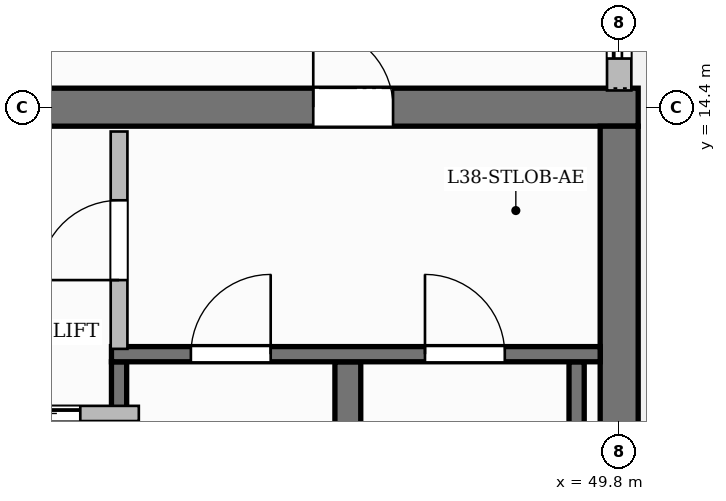
"""IFC4 building model, lengths in metres.
Left out: names, types, materials, properties, quantities, classifications, styles, units other than length and angle.
Written with IfcOpenShell. Run it as: python <this file> out.ifc"""

import sys

from ifc_helpers import new_model, si_unit, direction, frame, frame_2d, origin, place, context, subcontext, project, spatial, rectangle, extrude, source, transform, mapped, element, fill, save


model = new_model("IFC4")
c1 = context("Model", 3, precision=1e-05, world=origin(), true_north=direction((0.0, 1.0)))
c2 = subcontext(c1, "Body", "Model", "MODEL_VIEW")
j1 = project(units=[si_unit("LENGTHUNIT", "METRE"), si_unit("PLANEANGLEUNIT", "RADIAN")], contexts=[c1])
p1 = place(None, origin())
s1 = spatial("IfcSite", under=j1, at=p1, CompositionType="ELEMENT")
p2 = place(p1, origin())
s2 = spatial("IfcBuilding", under=s1, at=p2, CompositionType="ELEMENT")
p3 = place(p2, frame((0.0, 0.0, 154.15)))
s3 = spatial("IfcBuildingStorey", under=s2, at=p3, CompositionType="ELEMENT", Elevation=154.15)
p4 = place(p3, frame((34.55, 14.4, 0.0), z_axis=(0.0, 0.0, 1.0), x_axis=(1.0, 0.0, 0.0)))
e1 = element("IfcWall", 1, at=p4, inside=s3, PredefinedType="SHEAR", context=c2, shape_type="SweptSolid", body=[
    extrude(rectangle(XDim=15.5, YDim=0.5, at=frame_2d((7.75, 0.0))), origin(), (0.0, 0.0, 1.0), 3.85),
])
p5 = place(p4, frame((5.38, 0.0, 0.0)))
e2 = element("IfcOpeningElement", 2, at=p5, cuts=e1, PredefinedType="OPENING", context=c2, shape_type="SweptSolid", body=[
    extrude(rectangle(XDim=1.5, YDim=2.2, at=frame_2d((0.75, 1.1))), frame((0.0, 0.26, 0.0), z_axis=(0.0, -1.0, 0.0), x_axis=(1.0, 0.0, 0.0)), (0.0, 0.0, 1.0), 0.52),
])
p6 = place(p4, frame((1.595, 0.0, 0.0)))
e3 = element("IfcOpeningElement", 3, at=p6, cuts=e1, PredefinedType="OPENING", context=c2, shape_type="SweptSolid", body=[
    extrude(rectangle(XDim=1.05, YDim=2.15, at=frame_2d((0.525, 1.075))), frame((0.0, 0.26, 0.0), z_axis=(0.0, -1.0, 0.0), x_axis=(1.0, 0.0, 0.0)), (0.0, 0.0, 1.0), 0.52),
])
p7 = place(p4, frame((11.225, 0.0, 0.0)))
e4 = element("IfcOpeningElement", 4, at=p7, cuts=e1, PredefinedType="OPENING", context=c2, shape_type="SweptSolid", body=[
    extrude(rectangle(XDim=1.05, YDim=2.15, at=frame_2d((0.525, 1.075))), frame((0.0, 0.26, 0.0), z_axis=(0.0, -1.0, 0.0), x_axis=(1.0, 0.0, 0.0)), (0.0, 0.0, 1.0), 0.52),
])
p8 = place(p3, frame((49.8, 3.85, 0.0), z_axis=(0.0, 0.0, 1.0), x_axis=(0.0, 1.0, 0.0)))
e5 = element("IfcWall", 5, at=p8, inside=s3, PredefinedType="SHEAR", context=c2, shape_type="SweptSolid", body=[
    extrude(rectangle(XDim=10.3, YDim=0.5, at=frame_2d((5.15, 0.0))), origin(), (0.0, 0.0, 1.0), 3.85),
])
p9 = place(p3, frame((43.22, 4.1, 0.0), z_axis=(0.0, 0.0, 1.0), x_axis=(0.0, 1.0, 0.0)))
e6 = element("IfcWall", 6, at=p9, inside=s3, PredefinedType="SHEAR", context=c2, shape_type="SweptSolid", body=[
    extrude(rectangle(XDim=6.95, YDim=0.2, at=frame_2d((3.475, 0.0))), origin(), (0.0, 0.0, 1.0), 3.85),
])
p10 = place(p3, frame((46.23, 4.1, 0.0), z_axis=(0.0, 0.0, 1.0), x_axis=(0.0, 1.0, 0.0)))
e7 = element("IfcWall", 7, at=p10, inside=s3, PredefinedType="SHEAR", context=c2, shape_type="SweptSolid", body=[
    extrude(rectangle(XDim=6.95, YDim=0.34, at=frame_2d((3.475, 0.0))), origin(), (0.0, 0.0, 1.0), 3.85),
])
p11 = place(p3, frame((49.24, 4.1, 0.0), z_axis=(0.0, 0.0, 1.0), x_axis=(0.0, 1.0, 0.0)))
e8 = element("IfcWall", 8, at=p11, inside=s3, PredefinedType="SHEAR", context=c2, shape_type="SweptSolid", body=[
    extrude(rectangle(XDim=6.95, YDim=0.2, at=frame_2d((3.475, 0.0))), origin(), (0.0, 0.0, 1.0), 3.85),
])
p12 = place(p3, frame((43.12, 11.15, 0.0), z_axis=(0.0, 0.0, 1.0), x_axis=(1.0, 0.0, 0.0)))
e9 = element("IfcWall", 9, at=p12, inside=s3, PredefinedType="SHEAR", context=c2, shape_type="SweptSolid", body=[
    extrude(rectangle(XDim=6.43, YDim=0.2, at=frame_2d((3.215, 0.0))), origin(), (0.0, 0.0, 1.0), 3.85),
])
p13 = place(p12, frame((1.045, 0.0, 0.0)))
e10 = element("IfcOpeningElement", 10, at=p13, cuts=e9, PredefinedType="OPENING", context=c2, shape_type="SweptSolid", body=[
    extrude(rectangle(XDim=1.05, YDim=2.2, at=frame_2d((0.525, 1.1))), frame((0.0, 0.11, 0.0), z_axis=(0.0, -1.0, 0.0), x_axis=(1.0, 0.0, 0.0)), (0.0, 0.0, 1.0), 0.22),
])
p14 = place(p12, frame((4.125, 0.0, 0.0)))
e11 = element("IfcOpeningElement", 11, at=p14, cuts=e9, PredefinedType="OPENING", context=c2, shape_type="SweptSolid", body=[
    extrude(rectangle(XDim=1.05, YDim=2.2, at=frame_2d((0.525, 1.1))), frame((0.0, 0.11, 0.0), z_axis=(0.0, -1.0, 0.0), x_axis=(1.0, 0.0, 0.0)), (0.0, 0.0, 1.0), 0.22),
])
p15 = place(p3, frame((43.22, 11.22, 0.0), z_axis=(0.0, 0.0, 1.0), x_axis=(0.0, 1.0, 0.0)))
e12 = element("IfcWall", 12, at=p15, inside=s3, PredefinedType="PARTITIONING", context=c2, shape_type="SweptSolid", body=[
    extrude(rectangle(XDim=2.86, YDim=0.22, at=frame_2d((1.43, 0.0))), origin(), (0.0, 0.0, 1.0), 3.6),
])
p16 = place(p15, frame((0.905, 0.0, 0.0)))
e13 = element("IfcOpeningElement", 13, at=p16, cuts=e12, PredefinedType="OPENING", context=c2, shape_type="SweptSolid", body=[
    extrude(rectangle(XDim=1.05, YDim=2.15, at=frame_2d((0.525, 1.075))), frame((0.0, 0.12, 0.0), z_axis=(0.0, -1.0, 0.0), x_axis=(1.0, 0.0, 0.0)), (0.0, 0.0, 1.0), 0.24),
])
p17 = place(p3, frame((40.84, 10.37, 0.0), z_axis=(0.0, 0.0, 1.0), x_axis=(1.0, 0.0, 0.0)))
e14 = element("IfcWall", 14, at=p17, inside=s3, PredefinedType="PARTITIONING", context=c2, shape_type="SweptSolid", body=[
    extrude(rectangle(XDim=2.64, YDim=0.2, at=frame_2d((1.32, 0.0))), origin(), (0.0, 0.0, 1.0), 3.6),
])
p18 = place(p17, frame((0.77, 0.0, 0.0)))
e15 = element("IfcOpeningElement", 15, at=p18, cuts=e14, PredefinedType="OPENING", context=c2, shape_type="SweptSolid", body=[
    extrude(rectangle(XDim=1.1, YDim=2.2, at=frame_2d((0.55, 1.1))), frame((0.0, 0.11, 0.0), z_axis=(0.0, -1.0, 0.0), x_axis=(1.0, 0.0, 0.0)), (0.0, 0.0, 1.0), 0.22),
])
p19 = place(p3, frame((49.8, 14.62, 0.0), z_axis=(0.0, 0.0, 1.0), x_axis=(0.0, 1.0, 0.0)))
e16 = element("IfcWall", 16, at=p19, inside=s3, PredefinedType="SOLIDWALL", context=c2, shape_type="SweptSolid", body=[
    extrude(rectangle(XDim=6.93, YDim=0.32, at=frame_2d((3.465, 0.0))), origin(), (0.0, 0.0, 1.0), 3.085),
])
p20 = place(p19, frame((0.42, 0.0, 0.0)))
e17 = element("IfcOpeningElement", 17, at=p20, cuts=e16, PredefinedType="OPENING", context=c2, shape_type="SweptSolid", body=[
    extrude(rectangle(XDim=1.2, YDim=2.2, at=frame_2d((0.6, 1.1))), frame((0.0, 0.17, 0.0), z_axis=(0.0, -1.0, 0.0), x_axis=(1.0, 0.0, 0.0)), (0.0, 0.0, 1.0), 0.34),
])
p21 = place(p19, frame((3.384, 0.0, 0.8)))
e18 = element("IfcOpeningElement", 18, at=p21, cuts=e16, PredefinedType="OPENING", context=c2, shape_type="SweptSolid", body=[
    extrude(rectangle(XDim=1.8, YDim=1.85, at=frame_2d((0.9, 0.925))), frame((0.0, 0.17, 0.0), z_axis=(0.0, -1.0, 0.0), x_axis=(1.0, 0.0, 0.0)), (0.0, 0.0, 1.0), 0.34),
])
m1 = source(origin(), c2, "Body", "SweptSolid", [
    extrude(rectangle(XDim=1.05, YDim=2.2, at=frame_2d((0.525, 1.1))), frame((0.0, 0.025, 0.0), z_axis=(0.0, -1.0, 0.0), x_axis=(1.0, 0.0, 0.0)), (0.0, 0.0, 1.0), 0.05),
])
p22 = place(p13, origin())
e19 = element("IfcDoor", 19, at=p22, inside=s3, OperationType="SINGLE_SWING_RIGHT", PredefinedType="DOOR", context=c2, shape_type="MappedRepresentation", body=[
    mapped(m1, transform((0.0, 0.0, 0.0), scale=1.0)),
])
fill(e10, e19)
p23 = place(p14, origin())
e20 = element("IfcDoor", 20, at=p23, inside=s3, OperationType="SINGLE_SWING_LEFT", PredefinedType="DOOR", context=c2, shape_type="MappedRepresentation", body=[
    mapped(m1, transform((0.0, 0.0, 0.0), scale=1.0)),
])
fill(e11, e20)
m2 = source(origin(), c2, "Body", "SweptSolid", [
    extrude(rectangle(XDim=1.05, YDim=2.15, at=frame_2d((0.525, 1.075))), frame((0.0, 0.025, 0.0), z_axis=(0.0, -1.0, 0.0), x_axis=(1.0, 0.0, 0.0)), (0.0, 0.0, 1.0), 0.05),
])
p24 = place(p16, origin())
e21 = element("IfcDoor", 21, at=p24, inside=s3, OperationType="SINGLE_SWING_LEFT", PredefinedType="DOOR", context=c2, shape_type="MappedRepresentation", body=[
    mapped(m2, transform((0.0, 0.0, 0.0), scale=1.0)),
])
fill(e13, e21)
p25 = place(p7, origin())
e22 = element("IfcDoor", 22, at=p25, inside=s3, OperationType="SINGLE_SWING_LEFT", PredefinedType="DOOR", context=c2, shape_type="MappedRepresentation", body=[
    mapped(m2, transform((0.0, 0.0, 0.0), scale=1.0)),
])
fill(e4, e22)
m3 = source(origin(), c2, "Body", "SweptSolid", [
    extrude(rectangle(XDim=1.1, YDim=2.2, at=frame_2d((0.55, 1.1))), frame((0.0, 0.025, 0.0), z_axis=(0.0, -1.0, 0.0), x_axis=(1.0, 0.0, 0.0)), (0.0, 0.0, 1.0), 0.05),
])
p26 = place(p18, origin())
e23 = element("IfcDoor", 23, at=p26, inside=s3, OperationType="SLIDING_TO_LEFT", PredefinedType="DOOR", context=c2, shape_type="MappedRepresentation", body=[
    mapped(m3, transform((0.0, 0.0, 0.0), scale=1.0)),
])
fill(e15, e23)
m4 = source(origin(), c2, "Body", "SweptSolid", [
    extrude(rectangle(XDim=1.2, YDim=2.2, at=frame_2d((0.6, 1.1))), frame((0.0, 0.025, 0.0), z_axis=(0.0, -1.0, 0.0), x_axis=(1.0, 0.0, 0.0)), (0.0, 0.0, 1.0), 0.05),
])
p27 = place(p20, origin())
e24 = element("IfcDoor", 24, at=p27, inside=s3, OperationType="SLIDING_TO_LEFT", PredefinedType="DOOR", context=c2, shape_type="MappedRepresentation", body=[
    mapped(m4, transform((0.0, 0.0, 0.0), scale=1.0)),
])
fill(e17, e24)
save(model, sys.argv[1])
